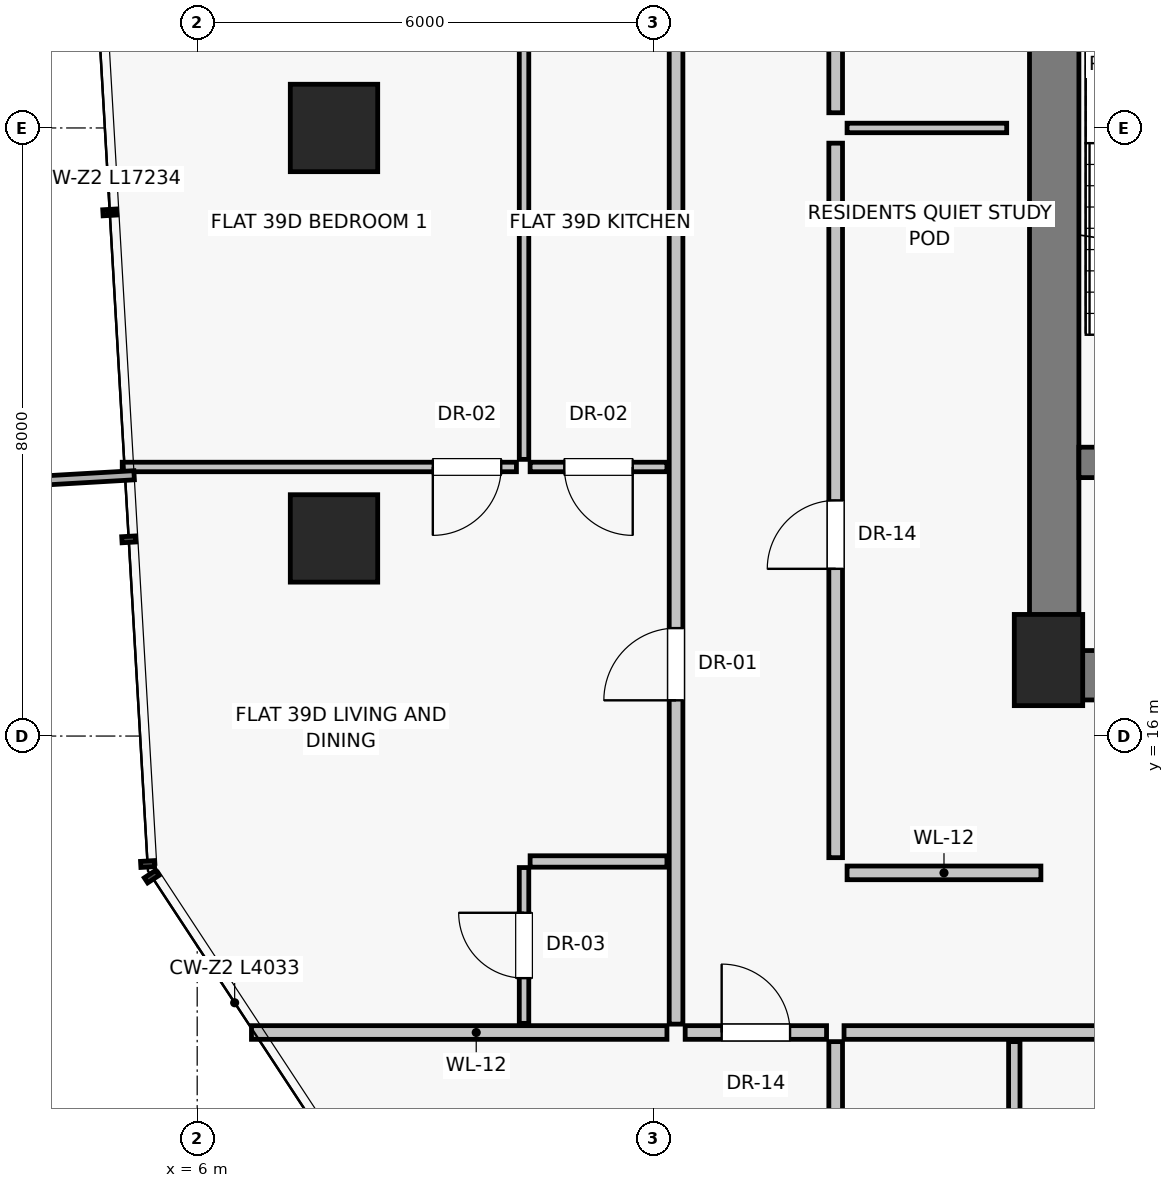
"""IFC4 building model, lengths in metres.
Left out: names, types, materials, properties, quantities, classifications, styles, units other than length and angle.
Written with IfcOpenShell. Run it as: python <this file> out.ifc"""

import sys

from ifc_helpers import new_model, si_unit, direction, frame, frame_2d, origin, origin_2d, place, context, subcontext, project, spatial, rectangle, extrude, source, transform, mapped, element, fill, save


model = new_model("IFC4")
c1 = context("Model", 3, precision=1e-05, world=origin(), true_north=direction((0.0, 1.0)))
c2 = subcontext(c1, "Body", "Model", "MODEL_VIEW")
j1 = project(units=[si_unit("LENGTHUNIT", "METRE"), si_unit("PLANEANGLEUNIT", "RADIAN")], contexts=[c1])
p1 = place(None, origin())
s1 = spatial("IfcSite", under=j1, at=p1, CompositionType="ELEMENT")
p2 = place(p1, origin())
s2 = spatial("IfcBuilding", under=s1, at=p2, CompositionType="ELEMENT")
p3 = place(p2, frame((0.0, 0.0, 139.25)))
s3 = spatial("IfcBuildingStorey", under=s2, at=p3, CompositionType="ELEMENT", Elevation=139.25)
p4 = place(p3, frame((17.2, 17.0, 0.0), z_axis=(0.0, 0.0, 1.0), x_axis=(1.0, 0.0, 0.0)))
e1 = element("IfcColumn", 1, at=p4, inside=s3, PredefinedType="PILASTER", context=c2, shape_type="SweptSolid", body=[
    extrude(rectangle(XDim=0.9, YDim=1.2, at=origin_2d()), origin(), (0.0, 0.0, 1.0), 3.25),
])
for number, where, z_axis, x_axis in (
    (2, (7.8, 24.0, 0.0), (0.0, 0.0, 1.0), (1.0, 0.0, 0.0)),
    (3, (7.8, 18.6, 0.0), (0.0, 0.0, 1.0), (1.0, 0.0, 0.0)),
):
    element("IfcColumn", number, at=place(p3, frame(where, z_axis=z_axis, x_axis=x_axis)), inside=s3, PredefinedType="COLUMN", context=c2, shape_type="SweptSolid", body=[
        extrude(rectangle(XDim=1.15, YDim=1.15, at=origin_2d()), origin(), (0.0, 0.0, 1.0), 3.25),
    ])
p5 = place(p3, frame((17.275, 16.8, 0.0), z_axis=(0.0, 0.0, 1.0), x_axis=(0.0, 1.0, 0.0)))
e4 = element("IfcWall", 4, at=p5, inside=s3, PredefinedType="SHEAR", context=c2, shape_type="SweptSolid", body=[
    extrude(rectangle(XDim=14.2, YDim=0.65, at=frame_2d((7.1, 0.0))), origin(), (0.0, 0.0, 1.0), 3.0),
])
p6 = place(p3, frame((17.2, 16.8, 0.0), z_axis=(0.0, 0.0, 1.0), x_axis=(1.0, 0.0, 0.0)))
e5 = element("IfcWall", 5, at=p6, inside=s3, PredefinedType="SHEAR", context=c2, shape_type="SweptSolid", body=[
    extrude(rectangle(XDim=5.85, YDim=0.65, at=frame_2d((2.925, 0.0))), origin(), (0.0, 0.0, 1.0), 3.0),
])
p7 = place(p6, frame((1.15, 0.0, 0.0)))
e6 = element("IfcOpeningElement", 6, at=p7, cuts=e5, PredefinedType="OPENING", context=c2, shape_type="SweptSolid", body=[
    extrude(rectangle(XDim=1.2, YDim=2.03, at=frame_2d((0.6, 1.015))), frame((0.0, 0.335, 0.0), z_axis=(0.0, -1.0, 0.0), x_axis=(1.0, 0.0, 0.0)), (0.0, 0.0, 1.0), 0.67),
])
p8 = place(p3, frame((17.6, 19.6, 0.0), z_axis=(0.0, 0.0, 1.0), x_axis=(1.0, 0.0, 0.0)))
e7 = element("IfcWall", 7, at=p8, inside=s3, PredefinedType="SHEAR", context=c2, shape_type="SweptSolid", body=[
    extrude(rectangle(XDim=3.4, YDim=0.4, at=frame_2d((1.7, 0.0))), origin(), (0.0, 0.0, 1.0), 3.0),
])
p9 = place(p8, frame((1.05, 0.0, 0.0)))
e8 = element("IfcOpeningElement", 8, at=p9, cuts=e7, PredefinedType="OPENING", context=c2, shape_type="SweptSolid", body=[
    extrude(rectangle(XDim=1.1, YDim=2.03, at=frame_2d((0.55, 1.015))), frame((0.0, 0.21, 0.0), z_axis=(0.0, -1.0, 0.0), x_axis=(1.0, 0.0, 0.0)), (0.0, 0.0, 1.0), 0.42),
])
p10 = place(p3, frame((14.4, 14.4, 0.0), z_axis=(0.0, 0.0, 1.0), x_axis=(0.0, 1.0, 0.0)))
e9 = element("IfcWall", 9, at=p10, inside=s3, PredefinedType="PARTITIONING", context=c2, shape_type="SweptSolid", body=[
    extrude(rectangle(XDim=9.4, YDim=0.18, at=frame_2d((4.7, 0.0))), origin(), (0.0, 0.0, 1.0), 3.0),
])
p11 = place(p10, frame((3.8, 0.0, 0.0)))
e10 = element("IfcOpeningElement", 10, at=p11, cuts=e9, PredefinedType="OPENING", context=c2, shape_type="SweptSolid", body=[
    extrude(rectangle(XDim=0.9, YDim=2.01, at=frame_2d((0.45, 1.005))), frame((0.0, 0.1, 0.0), z_axis=(0.0, -1.0, 0.0), x_axis=(1.0, 0.0, 0.0)), (0.0, 0.0, 1.0), 0.2),
])
p12 = place(p3, frame((14.4, 24.2, 0.0), z_axis=(0.0, 0.0, 1.0), x_axis=(0.0, 1.0, 0.0)))
e11 = element("IfcWall", 11, at=p12, inside=s3, PredefinedType="PARTITIONING", context=c2, shape_type="SweptSolid", body=[
    extrude(rectangle(XDim=9.2, YDim=0.18, at=frame_2d((4.6, 0.0))), origin(), (0.0, 0.0, 1.0), 3.0),
])
p13 = place(p12, frame((3.8, 0.0, 0.0)))
e12 = element("IfcOpeningElement", 12, at=p13, cuts=e11, PredefinedType="OPENING", context=c2, shape_type="SweptSolid", body=[
    extrude(rectangle(XDim=0.9, YDim=2.01, at=frame_2d((0.45, 1.005))), frame((0.0, 0.1, 0.0), z_axis=(0.0, -1.0, 0.0), x_axis=(1.0, 0.0, 0.0)), (0.0, 0.0, 1.0), 0.2),
])
p14 = place(p3, frame((14.55, 24.0, 0.0), z_axis=(0.0, 0.0, 1.0), x_axis=(1.0, 0.0, 0.0)))
e13 = element("IfcWall", 13, at=p14, inside=s3, PredefinedType="PARTITIONING", context=c2, shape_type="SweptSolid", body=[
    extrude(rectangle(XDim=2.1, YDim=0.125, at=frame_2d((1.05, 0.0))), origin(), (0.0, 0.0, 1.0), 3.0),
])
p15 = place(p3, frame((14.55, 14.2, 0.0), z_axis=(0.0, 0.0, 1.0), x_axis=(1.0, 0.0, 0.0)))
e14 = element("IfcWall", 14, at=p15, inside=s3, PredefinedType="PARTITIONING", context=c2, shape_type="SweptSolid", body=[
    extrude(rectangle(XDim=2.55, YDim=0.18, at=frame_2d((1.275, 0.0))), origin(), (0.0, 0.0, 1.0), 3.0),
])
p16 = place(p3, frame((14.4, 11.98, 0.0), z_axis=(0.0, 0.0, 1.0), x_axis=(0.0, -1.0, 0.0)))
e15 = element("IfcWall", 15, at=p16, inside=s3, PredefinedType="PARTITIONING", context=c2, shape_type="SweptSolid", body=[
    extrude(rectangle(XDim=4.658, YDim=0.18, at=frame_2d((2.329, 0.0))), origin(), (0.0, 0.0, 1.0), 3.0),
])
p17 = place(p3, frame((14.51, 12.1, 0.0), z_axis=(0.0, 0.0, 1.0), x_axis=(1.0, 0.0, 0.0)))
e16 = element("IfcWall", 16, at=p17, inside=s3, PredefinedType="PARTITIONING", context=c2, shape_type="SweptSolid", body=[
    extrude(rectangle(XDim=5.996, YDim=0.18, at=frame_2d((2.998, 0.0))), origin(), (0.0, 0.0, 1.0), 2.58),
])
p18 = place(p17, frame((3.638, 0.0, 0.0)))
e17 = element("IfcOpeningElement", 17, at=p18, cuts=e16, PredefinedType="OPENING", context=c2, shape_type="SweptSolid", body=[
    extrude(rectangle(XDim=0.95, YDim=2.02, at=frame_2d((0.475, 1.01))), frame((0.0, 0.1, 0.0), z_axis=(0.0, -1.0, 0.0), x_axis=(1.0, 0.0, 0.0)), (0.0, 0.0, 1.0), 0.2),
])
p19 = place(p3, frame((16.75, 11.98, 0.0), z_axis=(0.0, 0.0, 1.0), x_axis=(0.0, -1.0, 0.0)))
e18 = element("IfcWall", 18, at=p19, inside=s3, PredefinedType="PARTITIONING", context=c2, shape_type="SweptSolid", body=[
    extrude(rectangle(XDim=2.05, YDim=0.15, at=frame_2d((1.025, 0.0))), origin(), (0.0, 0.0, 1.0), 3.0),
])
p20 = place(p3, frame((12.18, 12.1, 0.0), z_axis=(0.0, 0.0, 1.0), x_axis=(-1.0, 0.0, 0.0)))
e19 = element("IfcWall", 19, at=p20, inside=s3, PredefinedType="PARTITIONING", context=c2, shape_type="SweptSolid", body=[
    extrude(rectangle(XDim=5.466, YDim=0.18, at=frame_2d((2.733, 0.0))), origin(), (0.0, 0.0, 1.0), 3.0),
])
p21 = place(p3, frame((12.3, 12.21, 0.0), z_axis=(0.0, 0.0, 1.0), x_axis=(0.0, 1.0, 0.0)))
e20 = element("IfcWall", 20, at=p21, inside=s3, PredefinedType="PARTITIONING", context=c2, shape_type="SweptSolid", body=[
    extrude(rectangle(XDim=13.308, YDim=0.18, at=frame_2d((6.654, 0.0))), origin(), (0.0, 0.0, 1.0), 2.58),
])
p22 = place(p21, frame((4.26, 0.0, 0.0)))
e21 = element("IfcOpeningElement", 21, at=p22, cuts=e20, PredefinedType="OPENING", context=c2, shape_type="SweptSolid", body=[
    extrude(rectangle(XDim=0.95, YDim=2.02, at=frame_2d((0.475, 1.01))), frame((0.0, 0.1, 0.0), z_axis=(0.0, -1.0, 0.0), x_axis=(1.0, 0.0, 0.0)), (0.0, 0.0, 1.0), 0.2),
])
p23 = place(p3, frame((12.18, 14.35, 0.0), z_axis=(0.0, 0.0, 1.0), x_axis=(-1.0, 0.0, 0.0)))
e22 = element("IfcWall", 22, at=p23, inside=s3, PredefinedType="PARTITIONING", context=c2, shape_type="SweptSolid", body=[
    extrude(rectangle(XDim=1.8, YDim=0.15, at=frame_2d((0.9, 0.0))), origin(), (0.0, 0.0, 1.0), 3.0),
])
p24 = place(p3, frame((10.3, 12.22, 0.0), z_axis=(0.0, 0.0, 1.0), x_axis=(0.0, 1.0, 0.0)))
e23 = element("IfcWall", 23, at=p24, inside=s3, PredefinedType="PARTITIONING", context=c2, shape_type="SweptSolid", body=[
    extrude(rectangle(XDim=2.05, YDim=0.125, at=frame_2d((1.025, 0.0))), origin(), (0.0, 0.0, 1.0), 3.0),
])
p25 = place(p24, frame((0.595, 0.0, 0.0)))
e24 = element("IfcOpeningElement", 24, at=p25, cuts=e23, PredefinedType="OPENING", context=c2, shape_type="SweptSolid", body=[
    extrude(rectangle(XDim=0.86, YDim=2.01, at=frame_2d((0.43, 1.005))), frame((0.0, 0.073, 0.0), z_axis=(0.0, -1.0, 0.0), x_axis=(1.0, 0.0, 0.0)), (0.0, 0.0, 1.0), 0.145),
])
p26 = place(p3, frame((12.18, 19.54, 0.0), z_axis=(0.0, 0.0, 1.0), x_axis=(-1.0, 0.0, 0.0)))
e25 = element("IfcWall", 25, at=p26, inside=s3, PredefinedType="PARTITIONING", context=c2, shape_type="SweptSolid", body=[
    extrude(rectangle(XDim=1.8, YDim=0.125, at=frame_2d((0.9, 0.0))), origin(), (0.0, 0.0, 1.0), 3.0),
])
p27 = place(p26, frame((0.45, 0.0, 0.0)))
e26 = element("IfcOpeningElement", 26, at=p27, cuts=e25, PredefinedType="OPENING", context=c2, shape_type="SweptSolid", body=[
    extrude(rectangle(XDim=0.9, YDim=2.01, at=frame_2d((0.45, 1.005))), frame((0.0, 0.073, 0.0), z_axis=(0.0, -1.0, 0.0), x_axis=(1.0, 0.0, 0.0)), (0.0, 0.0, 1.0), 0.145),
])
p28 = place(p3, frame((10.3, 19.64, 0.0), z_axis=(0.0, 0.0, 1.0), x_axis=(0.0, 1.0, 0.0)))
e27 = element("IfcWall", 27, at=p28, inside=s3, PredefinedType="PARTITIONING", context=c2, shape_type="SweptSolid", body=[
    extrude(rectangle(XDim=5.868, YDim=0.125, at=frame_2d((2.934, 0.0))), origin(), (0.0, 0.0, 1.0), 3.0),
])
p29 = place(p3, frame((10.2, 19.54, 0.0), z_axis=(0.0, 0.0, 1.0), x_axis=(-1.0, 0.0, 0.0)))
e28 = element("IfcWall", 28, at=p29, inside=s3, PredefinedType="PARTITIONING", context=c2, shape_type="SweptSolid", body=[
    extrude(rectangle(XDim=5.186, YDim=0.125, at=frame_2d((2.593, 0.0))), origin(), (0.0, 0.0, 1.0), 3.0),
])
p30 = place(p29, frame((0.2, 0.0, 0.0)))
e29 = element("IfcOpeningElement", 29, at=p30, cuts=e28, PredefinedType="OPENING", context=c2, shape_type="SweptSolid", body=[
    extrude(rectangle(XDim=0.9, YDim=2.01, at=frame_2d((0.45, 1.005))), frame((0.0, 0.073, 0.0), z_axis=(0.0, -1.0, 0.0), x_axis=(1.0, 0.0, 0.0)), (0.0, 0.0, 1.0), 0.145),
])
p31 = place(p3, frame((12.42, 12.1, 0.0), z_axis=(0.0, 0.0, 1.0), x_axis=(1.0, 0.0, 0.0)))
e30 = element("IfcWall", 30, at=p31, inside=s3, PredefinedType="PARTITIONING", context=c2, shape_type="SweptSolid", body=[
    extrude(rectangle(XDim=1.86, YDim=0.18, at=frame_2d((0.93, 0.0))), origin(), (0.0, 0.0, 1.0), 3.0),
])
p32 = place(p31, frame((0.48, 0.0, 0.0)))
e31 = element("IfcOpeningElement", 31, at=p32, cuts=e30, PredefinedType="OPENING", context=c2, shape_type="SweptSolid", body=[
    extrude(rectangle(XDim=0.9, YDim=2.01, at=frame_2d((0.45, 1.005))), frame((0.0, 0.1, 0.0), z_axis=(0.0, -1.0, 0.0), x_axis=(1.0, 0.0, 0.0)), (0.0, 0.0, 1.0), 0.2),
])
m1 = source(origin(), c2, "Body", "SweptSolid", [
    extrude(rectangle(XDim=0.9, YDim=2.01, at=frame_2d((0.45, 1.005))), frame((0.0, 0.025, 0.0), z_axis=(0.0, -1.0, 0.0), x_axis=(1.0, 0.0, 0.0)), (0.0, 0.0, 1.0), 0.05),
])
p33 = place(p11, origin())
e32 = element("IfcDoor", 32, at=p33, inside=s3, OperationType="SINGLE_SWING_LEFT", PredefinedType="DOOR", context=c2, shape_type="MappedRepresentation", body=[
    mapped(m1, transform((0.0, 0.0, 0.0), scale=1.0)),
])
fill(e10, e32)
m2 = source(origin(), c2, "Body", "SweptSolid", [
    extrude(rectangle(XDim=0.95, YDim=2.02, at=frame_2d((0.475, 1.01))), frame((0.0, 0.025, 0.0), z_axis=(0.0, -1.0, 0.0), x_axis=(1.0, 0.0, 0.0)), (0.0, 0.0, 1.0), 0.05),
])
p34 = place(p22, origin())
e33 = element("IfcDoor", 33, at=p34, inside=s3, OperationType="SINGLE_SWING_LEFT", PredefinedType="DOOR", context=c2, shape_type="MappedRepresentation", body=[
    mapped(m2, transform((0.0, 0.0, 0.0), scale=1.0)),
])
fill(e21, e33)
m3 = source(origin(), c2, "Body", "SweptSolid", [
    extrude(rectangle(XDim=0.86, YDim=2.01, at=frame_2d((0.43, 1.005))), frame((0.0, 0.025, 0.0), z_axis=(0.0, -1.0, 0.0), x_axis=(1.0, 0.0, 0.0)), (0.0, 0.0, 1.0), 0.05),
])
p35 = place(p25, origin())
e34 = element("IfcDoor", 34, at=p35, inside=s3, OperationType="SINGLE_SWING_RIGHT", PredefinedType="DOOR", context=c2, shape_type="MappedRepresentation", body=[
    mapped(m3, transform((0.0, 0.0, 0.0), scale=1.0)),
])
fill(e24, e34)
p36 = place(p27, origin())
e35 = element("IfcDoor", 35, at=p36, inside=s3, OperationType="SINGLE_SWING_LEFT", PredefinedType="DOOR", context=c2, shape_type="MappedRepresentation", body=[
    mapped(m1, transform((0.0, 0.0, 0.0), scale=1.0)),
])
fill(e26, e35)
p37 = place(p30, origin())
e36 = element("IfcDoor", 36, at=p37, inside=s3, OperationType="SINGLE_SWING_RIGHT", PredefinedType="DOOR", context=c2, shape_type="MappedRepresentation", body=[
    mapped(m1, transform((0.0, 0.0, 0.0), scale=1.0)),
])
fill(e29, e36)
p38 = place(p32, origin())
e37 = element("IfcDoor", 37, at=p38, inside=s3, OperationType="SINGLE_SWING_LEFT", PredefinedType="DOOR", context=c2, shape_type="MappedRepresentation", body=[
    mapped(m1, transform((0.0, 0.0, 0.0), scale=1.0)),
])
fill(e31, e37)
save(model, sys.argv[1])
